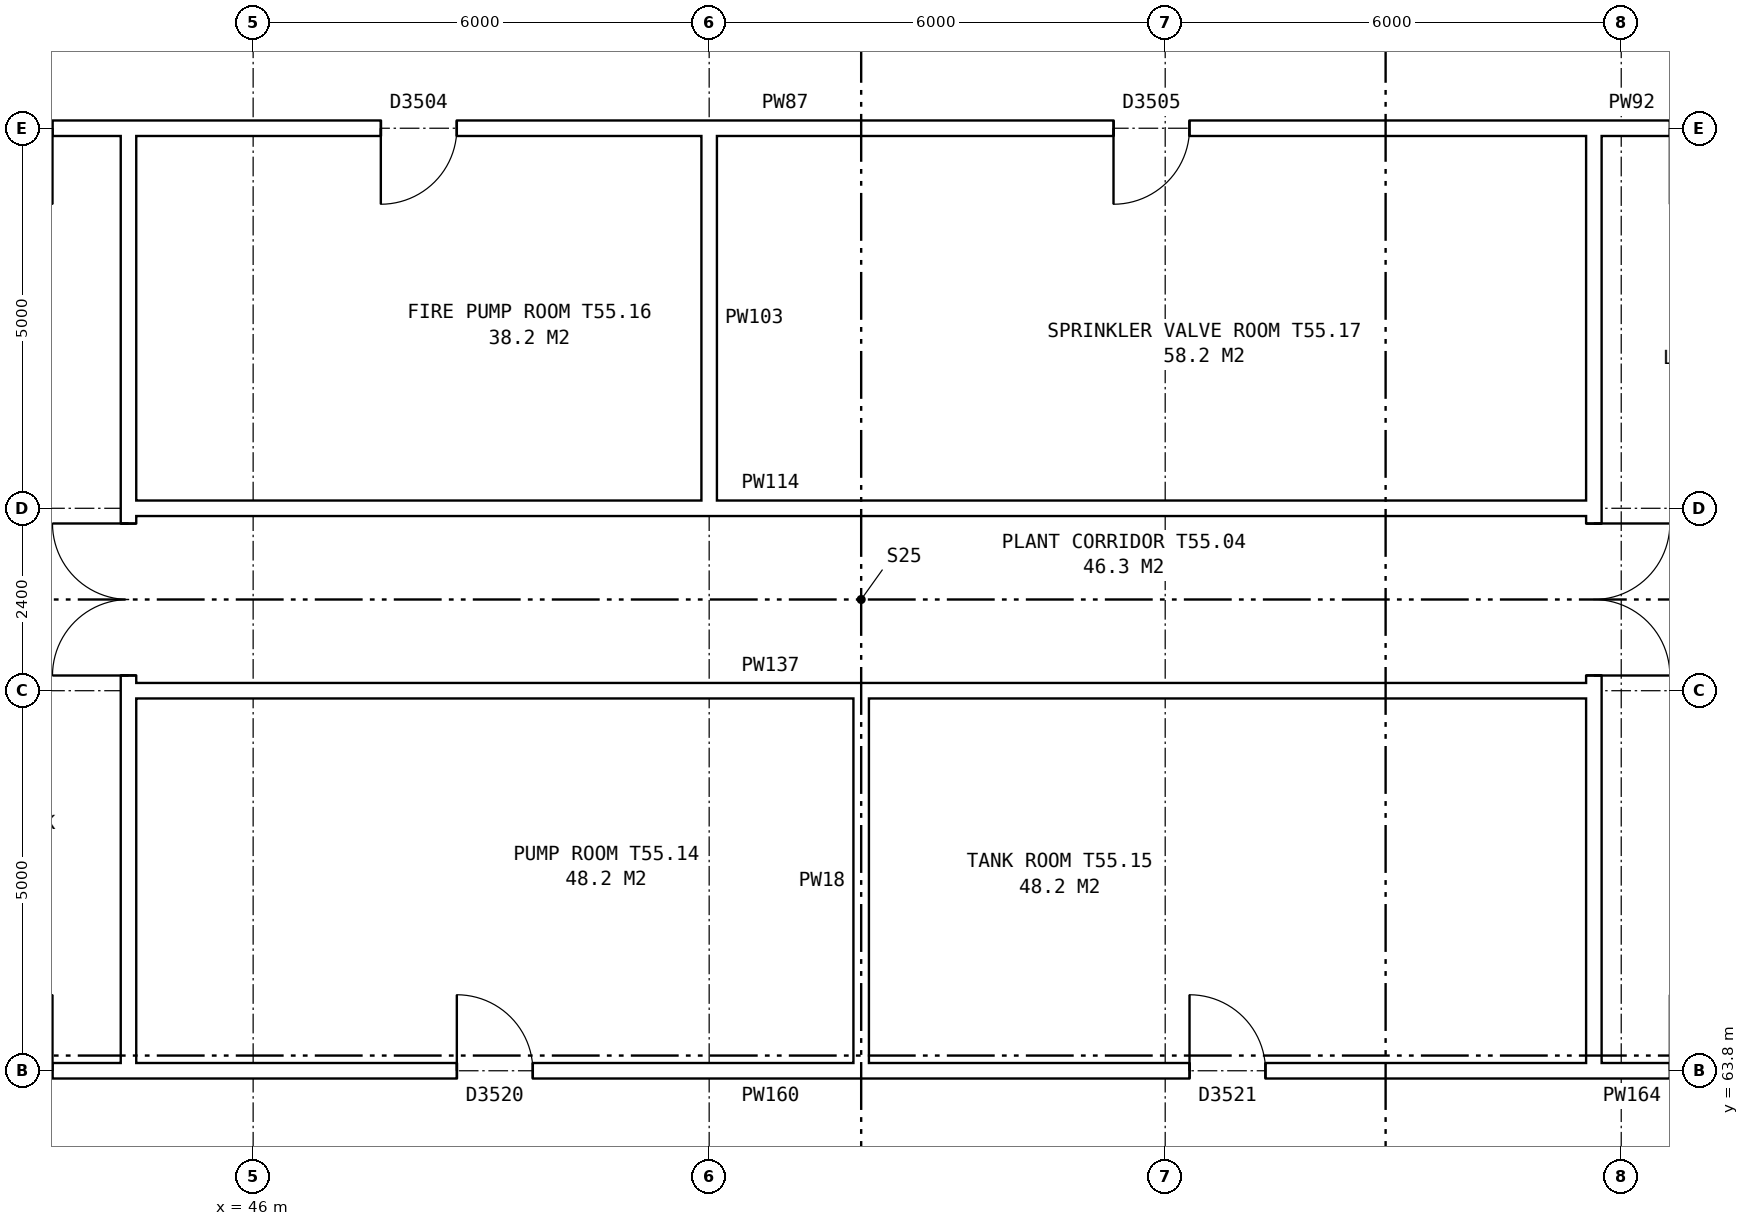
"""IFC4 building model, lengths in metres.
Left out: names, types, materials, properties, quantities, classifications, styles, units other than length and angle.
Written with IfcOpenShell. Run it as: python <this file> out.ifc"""

import sys

from ifc_helpers import new_model, si_unit, direction, frame, frame_2d, origin, place, context, subcontext, project, spatial, rectangle, extrude, element, fill, save


model = new_model("IFC4")
c1 = context("Model", 3, precision=1e-05, world=origin(), true_north=direction((0.0, 1.0)))
c2 = subcontext(c1, "Body", "Model", "MODEL_VIEW")
j1 = project(units=[si_unit("LENGTHUNIT", "METRE"), si_unit("PLANEANGLEUNIT", "RADIAN")], contexts=[c1])
p1 = place(None, origin())
s1 = spatial("IfcSite", under=j1, at=p1, CompositionType="ELEMENT")
p2 = place(p1, origin())
s2 = spatial("IfcBuilding", under=s1, at=p2, CompositionType="ELEMENT")
p3 = place(p2, frame((0.0, 0.0, 194.4)))
s3 = spatial("IfcBuildingStorey", under=s2, at=p3, CompositionType="ELEMENT", Elevation=194.4)
p4 = place(p3, frame((63.64, 63.9, 0.0), z_axis=(0.0, 0.0, 1.0), x_axis=(0.0, 1.0, 0.0)))
e1 = element("IfcWall", 1, at=p4, inside=s3, PredefinedType="PARTITIONING", context=c2, shape_type="SweptSolid", body=[
    extrude(rectangle(XDim=12.2, YDim=0.2, at=frame_2d((6.1, 0.0))), origin(), (0.0, 0.0, 1.0), 3.95),
])
p5 = place(p4, frame((5.1, 0.0, 0.0)))
e2 = element("IfcOpeningElement", 2, at=p5, cuts=e1, PredefinedType="OPENING", context=c2, shape_type="SweptSolid", body=[
    extrude(rectangle(XDim=2.0, YDim=2.1, at=frame_2d((1.0, 1.05))), frame((0.0, 0.11, 0.0), z_axis=(0.0, -1.0, 0.0), x_axis=(1.0, 0.0, 0.0)), (0.0, 0.0, 1.0), 0.22),
])
p6 = place(p3, frame((44.36, 63.9, 0.0), z_axis=(0.0, 0.0, 1.0), x_axis=(0.0, 1.0, 0.0)))
e3 = element("IfcWall", 3, at=p6, inside=s3, PredefinedType="PARTITIONING", context=c2, shape_type="SweptSolid", body=[
    extrude(rectangle(XDim=12.2, YDim=0.2, at=frame_2d((6.1, 0.0))), origin(), (0.0, 0.0, 1.0), 3.95),
])
p7 = place(p6, frame((5.1, 0.0, 0.0)))
e4 = element("IfcOpeningElement", 4, at=p7, cuts=e3, PredefinedType="OPENING", context=c2, shape_type="SweptSolid", body=[
    extrude(rectangle(XDim=2.0, YDim=2.1, at=frame_2d((1.0, 1.05))), frame((0.0, 0.11, 0.0), z_axis=(0.0, -1.0, 0.0), x_axis=(1.0, 0.0, 0.0)), (0.0, 0.0, 1.0), 0.22),
])
p8 = place(p3, frame((44.36, 63.8, 0.0), z_axis=(0.0, 0.0, 1.0), x_axis=(1.0, 0.0, 0.0)))
e5 = element("IfcWall", 5, at=p8, inside=s3, PredefinedType="PARTITIONING", context=c2, shape_type="SweptSolid", body=[
    extrude(rectangle(XDim=19.28, YDim=0.2, at=frame_2d((9.64, 0.0))), origin(), (0.0, 0.0, 1.0), 3.95),
])
p9 = place(p8, frame((4.32, 0.0, 0.0)))
e6 = element("IfcOpeningElement", 6, at=p9, cuts=e5, PredefinedType="OPENING", context=c2, shape_type="SweptSolid", body=[
    extrude(rectangle(XDim=1.0, YDim=2.1, at=frame_2d((0.5, 1.05))), frame((0.0, 0.11, 0.0), z_axis=(0.0, -1.0, 0.0), x_axis=(1.0, 0.0, 0.0)), (0.0, 0.0, 1.0), 0.22),
])
p10 = place(p8, frame((13.96, 0.0, 0.0)))
e7 = element("IfcOpeningElement", 7, at=p10, cuts=e5, PredefinedType="OPENING", context=c2, shape_type="SweptSolid", body=[
    extrude(rectangle(XDim=1.0, YDim=2.1, at=frame_2d((0.5, 1.05))), frame((0.0, 0.11, 0.0), z_axis=(0.0, -1.0, 0.0), x_axis=(1.0, 0.0, 0.0)), (0.0, 0.0, 1.0), 0.22),
])
p11 = place(p3, frame((41.36, 63.8, 0.0), z_axis=(0.0, 0.0, 1.0), x_axis=(1.0, 0.0, 0.0)))
e8 = element("IfcWall", 8, at=p11, inside=s3, PredefinedType="PARTITIONING", context=c2, shape_type="SweptSolid", body=[
    extrude(rectangle(XDim=3.0, YDim=0.2, at=frame_2d((1.5, 0.0))), origin(), (0.0, 0.0, 1.0), 3.95),
])
p12 = place(p11, frame((1.0, 0.0, 0.0)))
e9 = element("IfcOpeningElement", 9, at=p12, cuts=e8, PredefinedType="OPENING", context=c2, shape_type="SweptSolid", body=[
    extrude(rectangle(XDim=1.0, YDim=2.1, at=frame_2d((0.5, 1.05))), frame((0.0, 0.11, 0.0), z_axis=(0.0, -1.0, 0.0), x_axis=(1.0, 0.0, 0.0)), (0.0, 0.0, 1.0), 0.22),
])
p13 = place(p3, frame((63.64, 63.8, 0.0), z_axis=(0.0, 0.0, 1.0), x_axis=(1.0, 0.0, 0.0)))
e10 = element("IfcWall", 10, at=p13, inside=s3, PredefinedType="PARTITIONING", context=c2, shape_type="SweptSolid", body=[
    extrude(rectangle(XDim=3.0, YDim=0.2, at=frame_2d((1.5, 0.0))), origin(), (0.0, 0.0, 1.0), 3.95),
])
p14 = place(p13, frame((1.0, 0.0, 0.0)))
e11 = element("IfcOpeningElement", 11, at=p14, cuts=e10, PredefinedType="OPENING", context=c2, shape_type="SweptSolid", body=[
    extrude(rectangle(XDim=1.0, YDim=2.1, at=frame_2d((0.5, 1.05))), frame((0.0, 0.11, 0.0), z_axis=(0.0, -1.0, 0.0), x_axis=(1.0, 0.0, 0.0)), (0.0, 0.0, 1.0), 0.22),
])
for number, where, z_axis, x_axis in (
    (12, (44.36, 68.8, 0.0), (0.0, 0.0, 1.0), (1.0, 0.0, 0.0)),
    (13, (44.36, 71.2, 0.0), (0.0, 0.0, 1.0), (1.0, 0.0, 0.0)),
):
    element("IfcWall", number, at=place(p3, frame(where, z_axis=z_axis, x_axis=x_axis)), inside=s3, PredefinedType="PARTITIONING", context=c2, shape_type="SweptSolid", body=[
        extrude(rectangle(XDim=19.28, YDim=0.2, at=frame_2d((9.64, 0.0))), origin(), (0.0, 0.0, 1.0), 3.95),
    ])
p15 = place(p3, frame((44.36, 76.2, 0.0), z_axis=(0.0, 0.0, 1.0), x_axis=(1.0, 0.0, 0.0)))
e14 = element("IfcWall", 14, at=p15, inside=s3, PredefinedType="PARTITIONING", context=c2, shape_type="SweptSolid", body=[
    extrude(rectangle(XDim=19.28, YDim=0.2, at=frame_2d((9.64, 0.0))), origin(), (0.0, 0.0, 1.0), 3.95),
])
p16 = place(p15, frame((3.32, 0.0, 0.0)))
e15 = element("IfcOpeningElement", 15, at=p16, cuts=e14, PredefinedType="OPENING", context=c2, shape_type="SweptSolid", body=[
    extrude(rectangle(XDim=1.0, YDim=2.1, at=frame_2d((0.5, 1.05))), frame((0.0, 0.11, 0.0), z_axis=(0.0, -1.0, 0.0), x_axis=(1.0, 0.0, 0.0)), (0.0, 0.0, 1.0), 0.22),
])
p17 = place(p15, frame((12.96, 0.0, 0.0)))
e16 = element("IfcOpeningElement", 16, at=p17, cuts=e14, PredefinedType="OPENING", context=c2, shape_type="SweptSolid", body=[
    extrude(rectangle(XDim=1.0, YDim=2.1, at=frame_2d((0.5, 1.05))), frame((0.0, 0.11, 0.0), z_axis=(0.0, -1.0, 0.0), x_axis=(1.0, 0.0, 0.0)), (0.0, 0.0, 1.0), 0.22),
])
p18 = place(p3, frame((41.36, 76.2, 0.0), z_axis=(0.0, 0.0, 1.0), x_axis=(1.0, 0.0, 0.0)))
e17 = element("IfcWall", 17, at=p18, inside=s3, PredefinedType="PARTITIONING", context=c2, shape_type="SweptSolid", body=[
    extrude(rectangle(XDim=3.0, YDim=0.2, at=frame_2d((1.5, 0.0))), origin(), (0.0, 0.0, 1.0), 3.95),
])
p19 = place(p18, frame((1.0, 0.0, 0.0)))
e18 = element("IfcOpeningElement", 18, at=p19, cuts=e17, PredefinedType="OPENING", context=c2, shape_type="SweptSolid", body=[
    extrude(rectangle(XDim=1.0, YDim=2.1, at=frame_2d((0.5, 1.05))), frame((0.0, 0.11, 0.0), z_axis=(0.0, -1.0, 0.0), x_axis=(1.0, 0.0, 0.0)), (0.0, 0.0, 1.0), 0.22),
])
p20 = place(p3, frame((63.64, 76.2, 0.0), z_axis=(0.0, 0.0, 1.0), x_axis=(1.0, 0.0, 0.0)))
e19 = element("IfcWall", 19, at=p20, inside=s3, PredefinedType="PARTITIONING", context=c2, shape_type="SweptSolid", body=[
    extrude(rectangle(XDim=3.0, YDim=0.2, at=frame_2d((1.5, 0.0))), origin(), (0.0, 0.0, 1.0), 3.95),
])
p21 = place(p20, frame((1.0, 0.0, 0.0)))
e20 = element("IfcOpeningElement", 20, at=p21, cuts=e19, PredefinedType="OPENING", context=c2, shape_type="SweptSolid", body=[
    extrude(rectangle(XDim=1.0, YDim=2.1, at=frame_2d((0.5, 1.05))), frame((0.0, 0.11, 0.0), z_axis=(0.0, -1.0, 0.0), x_axis=(1.0, 0.0, 0.0)), (0.0, 0.0, 1.0), 0.22),
])
for number, where, z_axis, x_axis in (
    (21, (52.0, 71.1, 0.0), (0.0, 0.0, 1.0), (0.0, 1.0, 0.0)),
    (22, (54.0, 63.7, 0.0), (0.0, 0.0, 1.0), (0.0, 1.0, 0.0)),
):
    element("IfcWall", number, at=place(p3, frame(where, z_axis=z_axis, x_axis=x_axis)), inside=s3, PredefinedType="PARTITIONING", context=c2, shape_type="SweptSolid", body=[
        extrude(rectangle(XDim=5.2, YDim=0.2, at=frame_2d((2.6, 0.0))), origin(), (0.0, 0.0, 1.0), 3.95),
    ])
p22 = place(p5, frame((2.0, 0.0, 0.0), z_axis=(0.0, 0.0, 1.0), x_axis=(-1.0, 0.0, 0.0)))
e23 = element("IfcDoor", 23, at=p22, inside=s3, OperationType="DOUBLE_DOOR_SINGLE_SWING", PredefinedType="DOOR", context=c2, shape_type="SweptSolid", body=[
    extrude(rectangle(XDim=2.0, YDim=2.1, at=frame_2d((1.0, 1.05))), frame((0.0, 0.025, 0.0), z_axis=(0.0, -1.0, 0.0), x_axis=(1.0, 0.0, 0.0)), (0.0, 0.0, 1.0), 0.05),
])
fill(e2, e23)
p23 = place(p7, origin())
e24 = element("IfcDoor", 24, at=p23, inside=s3, OperationType="DOUBLE_DOOR_SINGLE_SWING", PredefinedType="DOOR", context=c2, shape_type="SweptSolid", body=[
    extrude(rectangle(XDim=2.0, YDim=2.1, at=frame_2d((1.0, 1.05))), frame((0.0, 0.025, 0.0), z_axis=(0.0, -1.0, 0.0), x_axis=(1.0, 0.0, 0.0)), (0.0, 0.0, 1.0), 0.05),
])
fill(e4, e24)
p24 = place(p9, origin())
e25 = element("IfcDoor", 25, at=p24, inside=s3, OperationType="SINGLE_SWING_LEFT", PredefinedType="DOOR", context=c2, shape_type="SweptSolid", body=[
    extrude(rectangle(XDim=1.0, YDim=2.1, at=frame_2d((0.5, 1.05))), frame((0.0, 0.025, 0.0), z_axis=(0.0, -1.0, 0.0), x_axis=(1.0, 0.0, 0.0)), (0.0, 0.0, 1.0), 0.05),
])
fill(e6, e25)
p25 = place(p10, origin())
e26 = element("IfcDoor", 26, at=p25, inside=s3, OperationType="SINGLE_SWING_LEFT", PredefinedType="DOOR", context=c2, shape_type="SweptSolid", body=[
    extrude(rectangle(XDim=1.0, YDim=2.1, at=frame_2d((0.5, 1.05))), frame((0.0, 0.025, 0.0), z_axis=(0.0, -1.0, 0.0), x_axis=(1.0, 0.0, 0.0)), (0.0, 0.0, 1.0), 0.05),
])
fill(e7, e26)
p26 = place(p16, frame((1.0, 0.0, 0.0), z_axis=(0.0, 0.0, 1.0), x_axis=(-1.0, 0.0, 0.0)))
e27 = element("IfcDoor", 27, at=p26, inside=s3, OperationType="SINGLE_SWING_RIGHT", PredefinedType="DOOR", context=c2, shape_type="SweptSolid", body=[
    extrude(rectangle(XDim=1.0, YDim=2.1, at=frame_2d((0.5, 1.05))), frame((0.0, 0.025, 0.0), z_axis=(0.0, -1.0, 0.0), x_axis=(1.0, 0.0, 0.0)), (0.0, 0.0, 1.0), 0.05),
])
fill(e15, e27)
p27 = place(p17, frame((1.0, 0.0, 0.0), z_axis=(0.0, 0.0, 1.0), x_axis=(-1.0, 0.0, 0.0)))
e28 = element("IfcDoor", 28, at=p27, inside=s3, OperationType="SINGLE_SWING_RIGHT", PredefinedType="DOOR", context=c2, shape_type="SweptSolid", body=[
    extrude(rectangle(XDim=1.0, YDim=2.1, at=frame_2d((0.5, 1.05))), frame((0.0, 0.025, 0.0), z_axis=(0.0, -1.0, 0.0), x_axis=(1.0, 0.0, 0.0)), (0.0, 0.0, 1.0), 0.05),
])
fill(e16, e28)
save(model, sys.argv[1])
